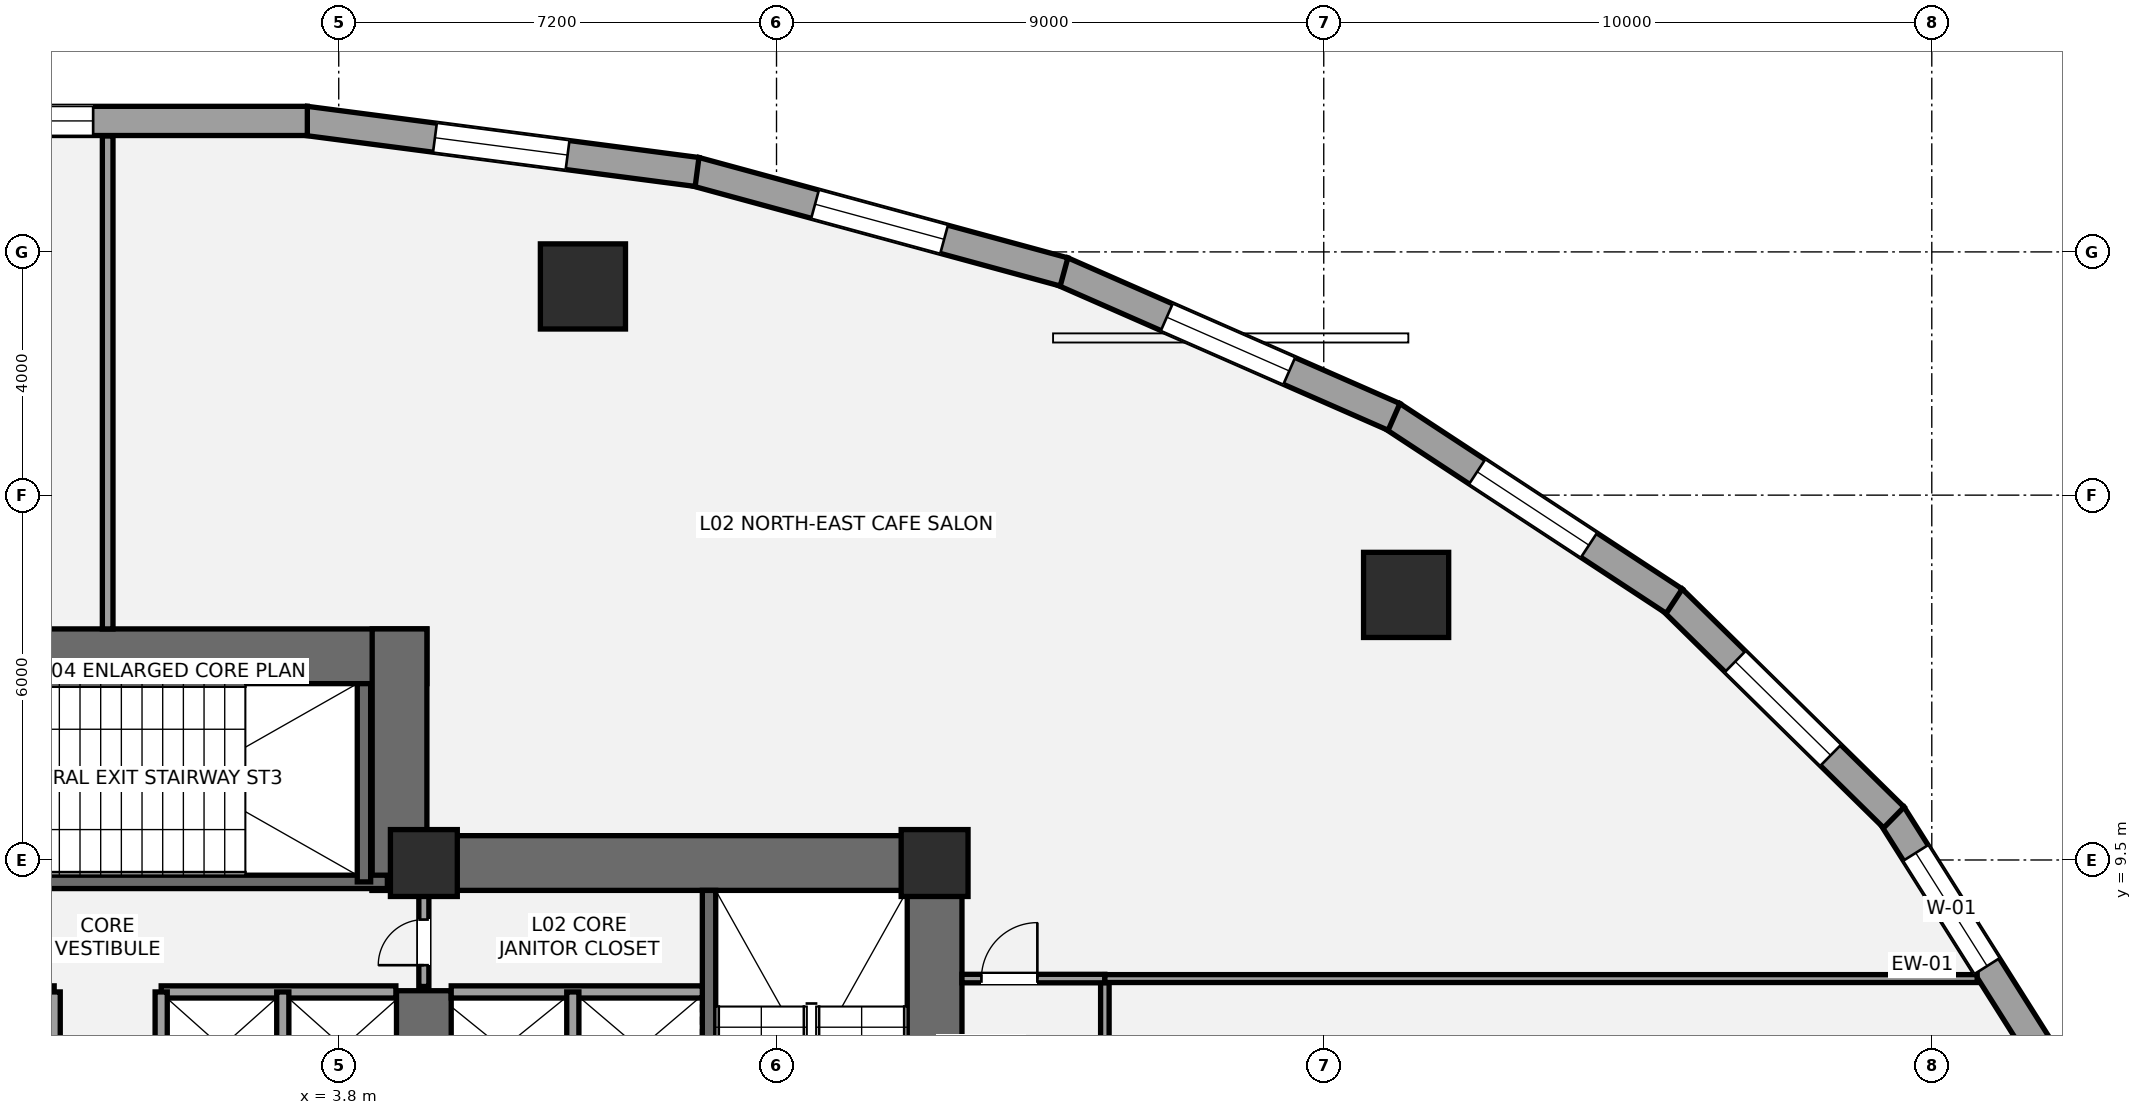
"""IFC4 building model, lengths in metres.
Left out: names, types, materials, properties, quantities, classifications, styles, units other than length and angle.
Written with IfcOpenShell. Run it as: python <this file> out.ifc"""

import sys

from ifc_helpers import new_model, si_unit, direction, frame, frame_2d, origin, origin_2d, place, context, subcontext, project, spatial, rectangle, hollow_circle, extrude, element, fill, save


model = new_model("IFC4")
c1 = context("Model", 3, precision=1e-05, world=origin(), true_north=direction((0.0, 1.0)))
c2 = subcontext(c1, "Body", "Model", "MODEL_VIEW")
j1 = project(units=[si_unit("LENGTHUNIT", "METRE"), si_unit("PLANEANGLEUNIT", "RADIAN")], contexts=[c1])
p1 = place(None, origin())
s1 = spatial("IfcSite", under=j1, at=p1, CompositionType="ELEMENT")
p2 = place(p1, origin())
s2 = spatial("IfcBuilding", under=s1, at=p2, CompositionType="ELEMENT")
p3 = place(p2, frame((0.0, 0.0, 10.2)))
s3 = spatial("IfcBuildingStorey", under=s2, at=p3, CompositionType="ELEMENT", Elevation=10.2)
p4 = place(p3, frame((13.6, 0.95, 0.0), z_axis=(0.0, 0.0, 1.0), x_axis=(0.0, 1.0, 0.0)))
e1 = element("IfcWall", 1, at=p4, inside=s3, PredefinedType="SHEAR", context=c2, shape_type="SweptSolid", body=[
    extrude(rectangle(XDim=8.95, YDim=0.9, at=frame_2d((4.475, 0.0))), origin(), (0.0, 0.0, 1.0), 4.2),
])
p5 = place(p3, frame((4.35, 9.45, 0.0), z_axis=(0.0, 0.0, 1.0), x_axis=(1.0, 0.0, 0.0)))
e2 = element("IfcWall", 2, at=p5, inside=s3, PredefinedType="SHEAR", context=c2, shape_type="SweptSolid", body=[
    extrude(rectangle(XDim=9.7, YDim=0.9, at=frame_2d((4.85, 0.0))), origin(), (0.0, 0.0, 1.0), 4.2),
])
p6 = place(p3, frame((5.2, 5.35, 0.0), z_axis=(0.0, 0.0, 1.0), x_axis=(0.0, 1.0, 0.0)))
e3 = element("IfcWall", 3, at=p6, inside=s3, PredefinedType="SHEAR", context=c2, shape_type="SweptSolid", body=[
    extrude(rectangle(XDim=2.0, YDim=0.9, at=frame_2d((1.0, 0.0))), origin(), (0.0, 0.0, 1.0), 4.2),
])
p7 = place(p3, frame((9.89, 1.85, 0.0), z_axis=(0.0, 0.0, 1.0), x_axis=(0.0, 1.0, 0.0)))
e4 = element("IfcWall", 4, at=p7, inside=s3, PredefinedType="SHEAR", context=c2, shape_type="SweptSolid", body=[
    extrude(rectangle(XDim=7.15, YDim=0.22, at=frame_2d((3.575, 0.0))), origin(), (0.0, 0.0, 1.0), 4.2),
])
p8 = place(p3, frame((-5.25, 12.85, 0.0), z_axis=(0.0, 0.0, 1.0), x_axis=(1.0, 0.0, 0.0)))
e5 = element("IfcWall", 5, at=p8, inside=s3, PredefinedType="SHEAR", context=c2, shape_type="SweptSolid", body=[
    extrude(rectangle(XDim=10.5, YDim=0.9, at=frame_2d((5.25, 0.0))), origin(), (0.0, 0.0, 1.0), 4.2),
])
p9 = place(p3, frame((4.8, 9.0, 0.0), z_axis=(0.0, 0.0, 1.0), x_axis=(0.0, 1.0, 0.0)))
e6 = element("IfcWall", 6, at=p9, inside=s3, PredefinedType="SHEAR", context=c2, shape_type="SweptSolid", body=[
    extrude(rectangle(XDim=4.3, YDim=0.9, at=frame_2d((2.15, 0.0))), origin(), (0.0, 0.0, 1.0), 4.2),
])
p10 = place(p3, frame((-4.7, 9.14, 0.0), z_axis=(0.0, 0.0, 1.0), x_axis=(1.0, 0.0, 0.0)))
e7 = element("IfcWall", 7, at=p10, inside=s3, PredefinedType="SHEAR", context=c2, shape_type="SweptSolid", body=[
    extrude(rectangle(XDim=9.3, YDim=0.22, at=frame_2d((4.65, 0.0))), origin(), (0.0, 0.0, 1.0), 4.2),
])
p11 = place(p10, frame((1.15, 0.0, 0.0)))
e8 = element("IfcOpeningElement", 8, at=p11, cuts=e7, PredefinedType="OPENING", context=c2, shape_type="SweptSolid", body=[
    extrude(rectangle(XDim=1.05, YDim=2.15, at=frame_2d((0.525, 1.075))), frame((0.0, 0.12, 0.0), z_axis=(0.0, -1.0, 0.0), x_axis=(1.0, 0.0, 0.0)), (0.0, 0.0, 1.0), 0.24),
])
p12 = place(p3, frame((4.215, 9.14, 0.0), z_axis=(0.0, 0.0, 1.0), x_axis=(0.0, 1.0, 0.0)))
e9 = element("IfcWall", 9, at=p12, inside=s3, PredefinedType="SHEAR", context=c2, shape_type="SweptSolid", body=[
    extrude(rectangle(XDim=3.26, YDim=0.22, at=frame_2d((1.63, 0.0))), origin(), (0.0, 0.0, 1.0), 4.2),
])
for number, where, z_axis, x_axis in (
    (10, (5.2, 9.45, 0.0), (0.0, 0.0, 1.0), (1.0, 0.0, 0.0)),
    (11, (13.6, 9.45, 0.0), (0.0, 0.0, 1.0), (1.0, 0.0, 0.0)),
):
    element("IfcColumn", number, at=place(p3, frame(where, z_axis=z_axis, x_axis=x_axis)), inside=s3, PredefinedType="COLUMN", context=c2, shape_type="SweptSolid", body=[
        extrude(rectangle(XDim=1.1, YDim=1.1, at=origin_2d()), origin(), (0.0, 0.0, 1.0), 4.2),
    ])
for number, where, z_axis, x_axis in (
    (12, (21.354, 13.859, 0.0), (0.0, 0.0, 1.0), (1.0, 0.0, 0.0)),
    (13, (7.816, 18.932, 0.0), (0.0, 0.0, 1.0), (1.0, 0.0, 0.0)),
):
    element("IfcColumn", number, at=place(p3, frame(where, z_axis=z_axis, x_axis=x_axis)), inside=s3, PredefinedType="USERDEFINED", context=c2, shape_type="SweptSolid", body=[
        extrude(hollow_circle(Radius=0.7, WallThickness=0.05, at=origin_2d()), origin(), (0.0, 0.0, 1.0), 4.2),
    ])
p13 = place(p3, frame((29.341, 10.243, 0.0), z_axis=(0.0, 0.0, 1.0), x_axis=(0.53349762721, -0.845801561693, 0.0)))
e14 = element("IfcWall", 14, at=p13, inside=s3, PredefinedType="STANDARD", context=c2, shape_type="SweptSolid", body=[
    extrude(rectangle(XDim=4.711, YDim=0.48, at=frame_2d((2.355, 0.0))), origin(), (0.0, 0.0, 1.0), 3.109),
])
p14 = place(p13, frame((0.74, 0.0, 0.7)))
e15 = element("IfcOpeningElement", 15, at=p14, cuts=e14, PredefinedType="OPENING", context=c2, shape_type="SweptSolid", body=[
    extrude(rectangle(XDim=2.2, YDim=1.95, at=frame_2d((1.1, 0.975))), frame((0.0, 0.25, 0.0), z_axis=(0.0, -1.0, 0.0), x_axis=(1.0, 0.0, 0.0)), (0.0, 0.0, 1.0), 0.5),
])
p15 = place(p3, frame((25.728, 13.785, 0.0), z_axis=(0.0, 0.0, 1.0), x_axis=(0.713189080178, -0.700971708355, 0.0)))
e16 = element("IfcWall", 16, at=p15, inside=s3, PredefinedType="STANDARD", context=c2, shape_type="SweptSolid", body=[
    extrude(rectangle(XDim=5.116, YDim=0.48, at=frame_2d((2.558, 0.0))), origin(), (0.0, 0.0, 1.0), 3.109),
])
p16 = place(p15, frame((1.458, 0.0, 0.7)))
e17 = element("IfcOpeningElement", 17, at=p16, cuts=e16, PredefinedType="OPENING", context=c2, shape_type="SweptSolid", body=[
    extrude(rectangle(XDim=2.2, YDim=1.95, at=frame_2d((1.1, 0.975))), frame((0.0, 0.25, 0.0), z_axis=(0.0, -1.0, 0.0), x_axis=(1.0, 0.0, 0.0)), (0.0, 0.0, 1.0), 0.5),
])
p17 = place(p3, frame((21.121, 16.806, 0.0), z_axis=(0.0, 0.0, 1.0), x_axis=(0.835863918172, -0.548936708827, 0.0)))
e18 = element("IfcWall", 18, at=p17, inside=s3, PredefinedType="STANDARD", context=c2, shape_type="SweptSolid", body=[
    extrude(rectangle(XDim=5.555, YDim=0.48, at=frame_2d((2.778, 0.0))), origin(), (0.0, 0.0, 1.0), 3.109),
])
p18 = place(p17, frame((1.678, 0.0, 0.7)))
e19 = element("IfcOpeningElement", 19, at=p18, cuts=e18, PredefinedType="OPENING", context=c2, shape_type="SweptSolid", body=[
    extrude(rectangle(XDim=2.2, YDim=1.95, at=frame_2d((1.1, 0.975))), frame((0.0, 0.25, 0.0), z_axis=(0.0, -1.0, 0.0), x_axis=(1.0, 0.0, 0.0)), (0.0, 0.0, 1.0), 0.5),
])
p19 = place(p3, frame((15.695, 19.183, 0.0), z_axis=(0.0, 0.0, 1.0), x_axis=(0.91570760638, -0.401845218484, 0.0)))
e20 = element("IfcWall", 20, at=p19, inside=s3, PredefinedType="STANDARD", context=c2, shape_type="SweptSolid", body=[
    extrude(rectangle(XDim=5.963, YDim=0.48, at=frame_2d((2.981, 0.0))), origin(), (0.0, 0.0, 1.0), 3.109),
])
p20 = place(p19, frame((1.882, 0.0, 0.7)))
e21 = element("IfcOpeningElement", 21, at=p20, cuts=e20, PredefinedType="OPENING", context=c2, shape_type="SweptSolid", body=[
    extrude(rectangle(XDim=2.2, YDim=1.95, at=frame_2d((1.1, 0.975))), frame((0.0, 0.25, 0.0), z_axis=(0.0, -1.0, 0.0), x_axis=(1.0, 0.0, 0.0)), (0.0, 0.0, 1.0), 0.5),
])
p21 = place(p3, frame((9.662, 20.821, 0.0), z_axis=(0.0, 0.0, 1.0), x_axis=(0.964936550718, -0.262483243445, 0.0)))
e22 = element("IfcWall", 22, at=p21, inside=s3, PredefinedType="STANDARD", context=c2, shape_type="SweptSolid", body=[
    extrude(rectangle(XDim=6.288, YDim=0.48, at=frame_2d((3.144, 0.0))), origin(), (0.0, 0.0, 1.0), 3.109),
])
p22 = place(p21, frame((2.044, 0.0, 0.7)))
e23 = element("IfcOpeningElement", 23, at=p22, cuts=e22, PredefinedType="OPENING", context=c2, shape_type="SweptSolid", body=[
    extrude(rectangle(XDim=2.2, YDim=1.95, at=frame_2d((1.1, 0.975))), frame((0.0, 0.25, 0.0), z_axis=(0.0, -1.0, 0.0), x_axis=(1.0, 0.0, 0.0)), (0.0, 0.0, 1.0), 0.5),
])
p23 = place(p3, frame((3.252, 21.656, 0.0), z_axis=(0.0, 0.0, 1.0), x_axis=(0.991576921472, -0.129519144545, 0.0)))
e24 = element("IfcWall", 24, at=p23, inside=s3, PredefinedType="STANDARD", context=c2, shape_type="SweptSolid", body=[
    extrude(rectangle(XDim=6.496, YDim=0.48, at=frame_2d((3.248, 0.0))), origin(), (0.0, 0.0, 1.0), 3.109),
])
p24 = place(p23, frame((2.148, 0.0, 0.7)))
e25 = element("IfcOpeningElement", 25, at=p24, cuts=e24, PredefinedType="OPENING", context=c2, shape_type="SweptSolid", body=[
    extrude(rectangle(XDim=2.2, YDim=1.95, at=frame_2d((1.1, 0.975))), frame((0.0, 0.25, 0.0), z_axis=(0.0, -1.0, 0.0), x_axis=(1.0, 0.0, 0.0)), (0.0, 0.0, 1.0), 0.5),
])
p25 = place(p3, frame((-3.284, 21.654, 0.0), z_axis=(0.0, 0.0, 1.0), x_axis=(1.0, 0.0, 0.0)))
e26 = element("IfcWall", 26, at=p25, inside=s3, PredefinedType="STANDARD", context=c2, shape_type="SweptSolid", body=[
    extrude(rectangle(XDim=6.567, YDim=0.48, at=frame_2d((3.284, 0.0))), origin(), (0.0, 0.0, 1.0), 3.109),
])
p26 = place(p25, frame((0.845, 0.0, 0.7)))
e27 = element("IfcOpeningElement", 27, at=p26, cuts=e26, PredefinedType="OPENING", context=c2, shape_type="SweptSolid", body=[
    extrude(rectangle(XDim=2.2, YDim=1.95, at=frame_2d((1.1, 0.975))), frame((0.0, 0.25, 0.0), z_axis=(0.0, -1.0, 0.0), x_axis=(1.0, 0.0, 0.0)), (0.0, 0.0, 1.0), 0.5),
])
p27 = place(p3, frame((5.65, 7.33, 0.0), z_axis=(0.0, 0.0, 1.0), x_axis=(1.0, 0.0, 0.0)))
e28 = element("IfcWall", 28, at=p27, inside=s3, PredefinedType="SOLIDWALL", context=c2, shape_type="SweptSolid", body=[
    extrude(rectangle(XDim=4.13, YDim=0.2, at=frame_2d((2.065, 0.0))), origin(), (0.0, 0.0, 1.0), 3.98),
])
p28 = place(p3, frame((7.65, 5.47, 0.0), z_axis=(0.0, 0.0, 1.0), x_axis=(0.0, 1.0, 0.0)))
e29 = element("IfcWall", 29, at=p28, inside=s3, PredefinedType="SOLIDWALL", context=c2, shape_type="SweptSolid", body=[
    extrude(rectangle(XDim=1.86, YDim=0.2, at=frame_2d((0.93, 0.0))), origin(), (0.0, 0.0, 1.0), 3.98),
])
for number, where, z_axis, x_axis in (
    (30, (-4.74, 7.33, 0.0), (0.0, 0.0, 1.0), (1.0, 0.0, 0.0)),
    (31, (0.88, 7.33, 0.0), (0.0, 0.0, 1.0), (1.0, 0.0, 0.0)),
):
    element("IfcWall", number, at=place(p3, frame(where, z_axis=z_axis, x_axis=x_axis)), inside=s3, PredefinedType="SOLIDWALL", context=c2, shape_type="SweptSolid", body=[
        extrude(rectangle(XDim=3.86, YDim=0.2, at=frame_2d((1.93, 0.0))), origin(), (0.0, 0.0, 1.0), 3.98),
    ])
for number, where, z_axis, x_axis in (
    (32, (2.88, 5.52, 0.0), (0.0, 0.0, 1.0), (0.0, 1.0, 0.0)),
    (33, (-0.88, 5.52, 0.0), (0.0, 0.0, 1.0), (0.0, 1.0, 0.0)),
    (34, (0.88, 5.52, 0.0), (0.0, 0.0, 1.0), (0.0, 1.0, 0.0)),
):
    element("IfcWall", number, at=place(p3, frame(where, z_axis=z_axis, x_axis=x_axis)), inside=s3, PredefinedType="SOLIDWALL", context=c2, shape_type="SweptSolid", body=[
        extrude(rectangle(XDim=1.81, YDim=0.2, at=frame_2d((0.905, 0.0))), origin(), (0.0, 0.0, 1.0), 3.98),
    ])
p29 = place(p3, frame((5.2, 7.42, 0.0), z_axis=(0.0, 0.0, 1.0), x_axis=(0.0, 1.0, 0.0)))
e35 = element("IfcWall", 35, at=p29, inside=s3, PredefinedType="PARTITIONING", context=c2, shape_type="SweptSolid", body=[
    extrude(rectangle(XDim=1.58, YDim=0.165, at=frame_2d((0.79, 0.0))), origin(), (0.0, 0.0, 1.0), 3.98),
])
p30 = place(p29, frame((0.35, 0.0, 0.0)))
e36 = element("IfcOpeningElement", 36, at=p30, cuts=e35, PredefinedType="OPENING", context=c2, shape_type="SweptSolid", body=[
    extrude(rectangle(XDim=0.75, YDim=2.1, at=frame_2d((0.375, 1.05))), frame((0.0, 0.093, 0.0), z_axis=(0.0, -1.0, 0.0), x_axis=(1.0, 0.0, 0.0)), (0.0, 0.0, 1.0), 0.185),
])
p31 = place(p3, frame((16.4, -18.603, 0.0), z_axis=(0.0, 0.0, 1.0), x_axis=(0.0, 1.0, 0.0)))
e37 = element("IfcWall", 37, at=p31, inside=s3, PredefinedType="PARTITIONING", context=c2, shape_type="SweptSolid", body=[
    extrude(rectangle(XDim=26.153, YDim=0.14, at=frame_2d((13.076, 0.0))), origin(), (0.0, 0.0, 1.0), 3.348),
])
p32 = place(p31, frame((14.802, 0.0, 0.0)))
e38 = element("IfcOpeningElement", 38, at=p32, cuts=e37, PredefinedType="OPENING", context=c2, shape_type="SweptSolid", body=[
    extrude(rectangle(XDim=0.9, YDim=2.1, at=frame_2d((0.45, 1.05))), frame((0.0, 0.08, 0.0), z_axis=(0.0, -1.0, 0.0), x_axis=(1.0, 0.0, 0.0)), (0.0, 0.0, 1.0), 0.16),
])
p33 = place(p31, frame((19.552, 0.0, 0.0)))
e39 = element("IfcOpeningElement", 39, at=p33, cuts=e37, PredefinedType="OPENING", context=c2, shape_type="SweptSolid", body=[
    extrude(rectangle(XDim=0.9, YDim=2.1, at=frame_2d((0.45, 1.05))), frame((0.0, 0.08, 0.0), z_axis=(0.0, -1.0, 0.0), x_axis=(1.0, 0.0, 0.0)), (0.0, 0.0, 1.0), 0.16),
])
p34 = place(p31, frame((23.827, 0.0, 0.0)))
e40 = element("IfcOpeningElement", 40, at=p34, cuts=e37, PredefinedType="OPENING", context=c2, shape_type="SweptSolid", body=[
    extrude(rectangle(XDim=0.9, YDim=2.1, at=frame_2d((0.45, 1.05))), frame((0.0, 0.08, 0.0), z_axis=(0.0, -1.0, 0.0), x_axis=(1.0, 0.0, 0.0)), (0.0, 0.0, 1.0), 0.16),
])
p35 = place(p3, frame((14.05, 7.55, 0.0), z_axis=(0.0, 0.0, 1.0), x_axis=(1.0, 0.0, 0.0)))
e41 = element("IfcWall", 41, at=p35, inside=s3, PredefinedType="PARTITIONING", context=c2, shape_type="SweptSolid", body=[
    extrude(rectangle(XDim=2.35, YDim=0.14, at=frame_2d((1.175, 0.0))), origin(), (0.0, 0.0, 1.0), 3.433),
])
p36 = place(p35, frame((0.32, 0.0, 0.0)))
e42 = element("IfcOpeningElement", 42, at=p36, cuts=e41, PredefinedType="OPENING", context=c2, shape_type="SweptSolid", body=[
    extrude(rectangle(XDim=0.92, YDim=2.15, at=frame_2d((0.46, 1.075))), frame((0.0, 0.08, 0.0), z_axis=(0.0, -1.0, 0.0), x_axis=(1.0, 0.0, 0.0)), (0.0, 0.0, 1.0), 0.16),
])
p37 = place(p3, frame((0.0, 13.3, 0.0), z_axis=(0.0, 0.0, 1.0), x_axis=(0.0, 1.0, 0.0)))
e43 = element("IfcWall", 43, at=p37, inside=s3, PredefinedType="PARTITIONING", context=c2, shape_type="SweptSolid", body=[
    extrude(rectangle(XDim=8.106, YDim=0.175, at=frame_2d((4.053, 0.0))), origin(), (0.0, 0.0, 1.0), 3.98),
])
p38 = place(p3, frame((16.4, 7.55, 0.0), z_axis=(0.0, 0.0, 1.0), x_axis=(1.0, 0.0, 0.0)))
e44 = element("IfcWall", 44, at=p38, inside=s3, PredefinedType="PARTITIONING", context=c2, shape_type="SweptSolid", body=[
    extrude(rectangle(XDim=14.347, YDim=0.13, at=frame_2d((7.173, 0.0))), origin(), (0.0, 0.0, 1.0), 2.958),
])
p39 = place(p14, origin())
e45 = element("IfcWindow", 45, at=p39, inside=s3, PartitioningType="SINGLE_PANEL", PredefinedType="WINDOW", context=c2, shape_type="SweptSolid", body=[
    extrude(rectangle(XDim=2.2, YDim=1.95, at=frame_2d((1.1, 0.975))), frame((0.0, -0.01, 0.0), z_axis=(0.0, -1.0, 0.0), x_axis=(1.0, 0.0, 0.0)), (0.0, 0.0, 1.0), 0.06),
])
fill(e15, e45)
p40 = place(p16, origin())
e46 = element("IfcWindow", 46, at=p40, inside=s3, PartitioningType="SINGLE_PANEL", PredefinedType="WINDOW", context=c2, shape_type="SweptSolid", body=[
    extrude(rectangle(XDim=2.2, YDim=1.95, at=frame_2d((1.1, 0.975))), frame((0.0, -0.01, 0.0), z_axis=(0.0, -1.0, 0.0), x_axis=(1.0, 0.0, 0.0)), (0.0, 0.0, 1.0), 0.06),
])
fill(e17, e46)
p41 = place(p18, origin())
e47 = element("IfcWindow", 47, at=p41, inside=s3, PartitioningType="SINGLE_PANEL", PredefinedType="WINDOW", context=c2, shape_type="SweptSolid", body=[
    extrude(rectangle(XDim=2.2, YDim=1.95, at=frame_2d((1.1, 0.975))), frame((0.0, -0.01, 0.0), z_axis=(0.0, -1.0, 0.0), x_axis=(1.0, 0.0, 0.0)), (0.0, 0.0, 1.0), 0.06),
])
fill(e19, e47)
p42 = place(p20, origin())
e48 = element("IfcWindow", 48, at=p42, inside=s3, PartitioningType="SINGLE_PANEL", PredefinedType="WINDOW", context=c2, shape_type="SweptSolid", body=[
    extrude(rectangle(XDim=2.2, YDim=1.95, at=frame_2d((1.1, 0.975))), frame((0.0, -0.01, 0.0), z_axis=(0.0, -1.0, 0.0), x_axis=(1.0, 0.0, 0.0)), (0.0, 0.0, 1.0), 0.06),
])
fill(e21, e48)
p43 = place(p22, origin())
e49 = element("IfcWindow", 49, at=p43, inside=s3, PartitioningType="SINGLE_PANEL", PredefinedType="WINDOW", context=c2, shape_type="SweptSolid", body=[
    extrude(rectangle(XDim=2.2, YDim=1.95, at=frame_2d((1.1, 0.975))), frame((0.0, -0.01, 0.0), z_axis=(0.0, -1.0, 0.0), x_axis=(1.0, 0.0, 0.0)), (0.0, 0.0, 1.0), 0.06),
])
fill(e23, e49)
p44 = place(p24, origin())
e50 = element("IfcWindow", 50, at=p44, inside=s3, PartitioningType="SINGLE_PANEL", PredefinedType="WINDOW", context=c2, shape_type="SweptSolid", body=[
    extrude(rectangle(XDim=2.2, YDim=1.95, at=frame_2d((1.1, 0.975))), frame((0.0, -0.01, 0.0), z_axis=(0.0, -1.0, 0.0), x_axis=(1.0, 0.0, 0.0)), (0.0, 0.0, 1.0), 0.06),
])
fill(e25, e50)
p45 = place(p26, origin())
e51 = element("IfcWindow", 51, at=p45, inside=s3, PartitioningType="SINGLE_PANEL", PredefinedType="WINDOW", context=c2, shape_type="SweptSolid", body=[
    extrude(rectangle(XDim=2.2, YDim=1.95, at=frame_2d((1.1, 0.975))), frame((0.0, -0.01, 0.0), z_axis=(0.0, -1.0, 0.0), x_axis=(1.0, 0.0, 0.0)), (0.0, 0.0, 1.0), 0.06),
])
fill(e27, e51)
p46 = place(p30, origin())
e52 = element("IfcDoor", 52, at=p46, inside=s3, OperationType="SINGLE_SWING_LEFT", PredefinedType="DOOR", context=c2, shape_type="SweptSolid", body=[
    extrude(rectangle(XDim=0.75, YDim=2.1, at=frame_2d((0.375, 1.05))), frame((0.0, 0.025, 0.0), z_axis=(0.0, -1.0, 0.0), x_axis=(1.0, 0.0, 0.0)), (0.0, 0.0, 1.0), 0.05),
])
fill(e36, e52)
p47 = place(p36, origin())
e53 = element("IfcDoor", 53, at=p47, inside=s3, OperationType="SINGLE_SWING_RIGHT", PredefinedType="DOOR", context=c2, shape_type="SweptSolid", body=[
    extrude(rectangle(XDim=0.92, YDim=2.15, at=frame_2d((0.46, 1.075))), frame((0.0, 0.025, 0.0), z_axis=(0.0, -1.0, 0.0), x_axis=(1.0, 0.0, 0.0)), (0.0, 0.0, 1.0), 0.05),
])
fill(e42, e53)
save(model, sys.argv[1])
